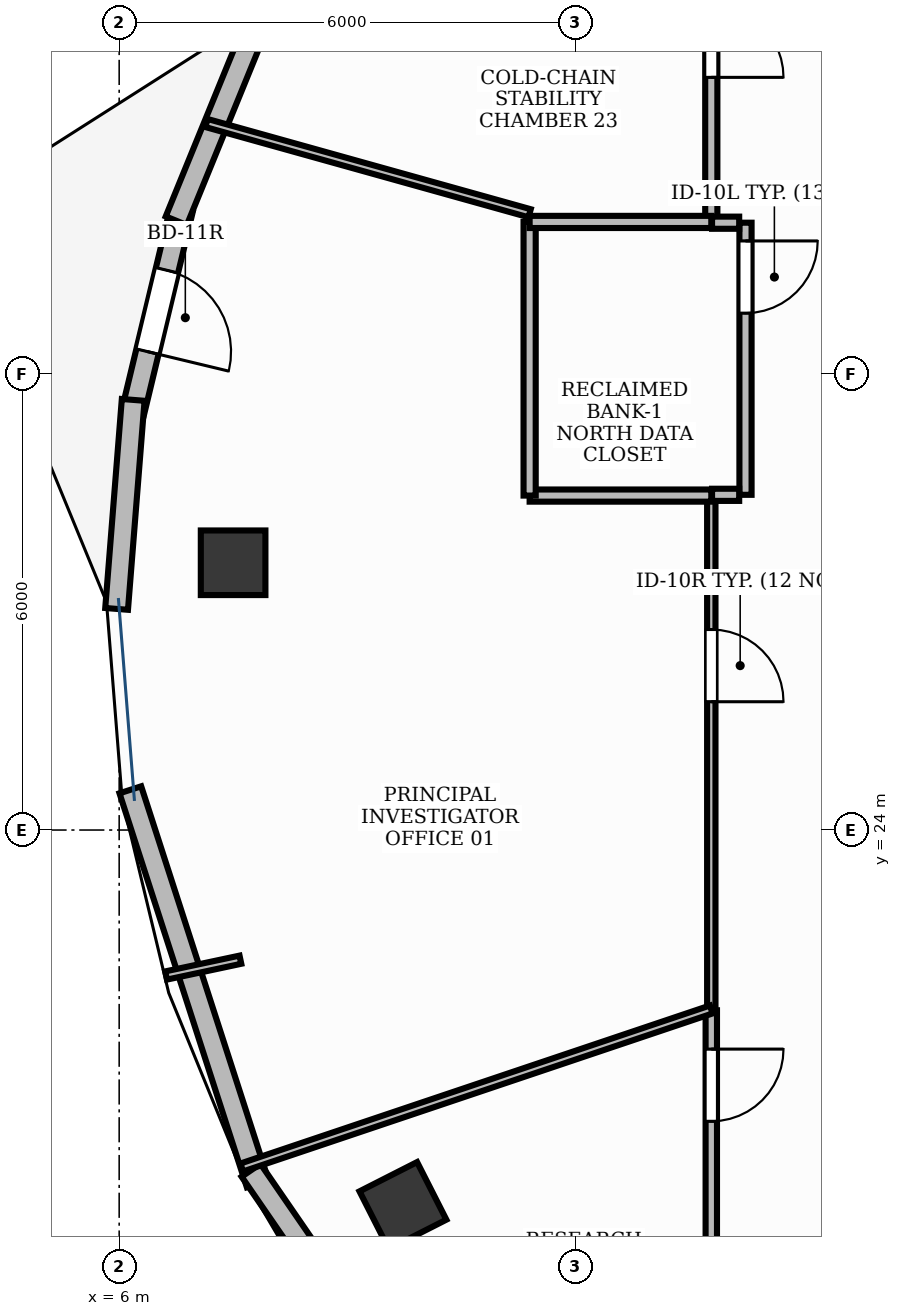
"""IFC4 building model, lengths in metres.
Left out: names, types, materials, properties, quantities, classifications, styles, units other than length and angle.
Written with IfcOpenShell. Run it as: python <this file> out.ifc"""

import sys

from ifc_helpers import new_model, si_unit, direction, frame, frame_2d, origin, origin_2d, place, context, subcontext, project, spatial, rectangle, extrude, element, fill, save


model = new_model("IFC4")
c1 = context("Model", 3, precision=1e-05, world=origin(), true_north=direction((0.0, 1.0)))
c2 = subcontext(c1, "Body", "Model", "MODEL_VIEW")
j1 = project(units=[si_unit("LENGTHUNIT", "METRE"), si_unit("PLANEANGLEUNIT", "RADIAN")], contexts=[c1])
p1 = place(None, origin())
s1 = spatial("IfcSite", under=j1, at=p1, CompositionType="ELEMENT")
p2 = place(p1, origin())
s2 = spatial("IfcBuilding", under=s1, at=p2, CompositionType="ELEMENT")
p3 = place(p2, frame((0.0, 0.0, 256.2)))
s3 = spatial("IfcBuildingStorey", under=s2, at=p3, CompositionType="ELEMENT", Elevation=256.2)
for number, where, z_axis, x_axis in (
    (1, (7.499, 27.516, -0.0), (0.0, 0.0, 1.0), (0.0, 1.0, 0.0)),
    (2, (9.733, 19.06, -0.0), (0.0, 0.0, 1.0), (-0.453, 0.891, 0.0)),
):
    element("IfcColumn", number, at=place(p3, frame(where, z_axis=z_axis, x_axis=x_axis)), inside=s3, PredefinedType="COLUMN", context=c2, shape_type="SweptSolid", body=[
        extrude(rectangle(XDim=0.85, YDim=0.85, at=origin_2d()), origin(), (0.0, 0.0, 1.0), 3.901),
    ])
p4 = place(p3, frame((6.822, 32.164, 0.0), z_axis=(0.0, 0.0, 1.0), x_axis=(-0.233611743884, -0.972329961031, 0.0)))
e3 = element("IfcWall", 3, at=p4, inside=s3, PredefinedType="STANDARD", context=c2, shape_type="SweptSolid", body=[
    extrude(rectangle(XDim=2.745, YDim=0.3, at=frame_2d((1.373, 0.0))), origin(), (0.0, 0.0, 1.0), 3.9),
])
p5 = place(p4, frame((0.823, 0.0, 0.0)))
e4 = element("IfcOpeningElement", 4, at=p5, cuts=e3, PredefinedType="OPENING", context=c2, shape_type="SweptSolid", body=[
    extrude(rectangle(XDim=1.1, YDim=2.15, at=frame_2d((0.55, 1.075))), frame((0.0, 0.165, 0.0), z_axis=(0.0, -1.0, 0.0), x_axis=(1.0, 0.0, 0.0)), (0.0, 0.0, 1.0), 0.33),
])
p6 = place(p3, frame((7.824, 34.642, 0.0), z_axis=(0.0, 0.0, 1.0), x_axis=(-0.378264258805, -0.925697656101, 0.0)))
e5 = element("IfcWall", 5, at=p6, inside=s3, PredefinedType="STANDARD", context=c2, shape_type="SweptSolid", body=[
    extrude(rectangle(XDim=2.837, YDim=0.3, at=frame_2d((1.419, 0.0))), origin(), (0.0, 0.0, 1.0), 3.9),
])
p7 = place(p3, frame((6.184, 29.659, 0.0), z_axis=(0.0, 0.0, 1.0), x_axis=(-0.079045093233, -0.996871041427, 0.0)))
e6 = element("IfcWall", 6, at=p7, inside=s3, PredefinedType="STANDARD", context=c2, shape_type="SweptSolid", body=[
    extrude(rectangle(XDim=2.758, YDim=0.3, at=frame_2d((1.379, 0.0))), origin(), (0.0, 0.0, 1.0), 3.9),
])
p8 = place(p3, frame((6.147, 24.529, 0.0), z_axis=(0.0, 0.0, 1.0), x_axis=(0.307501658213, -0.951547544895, 0.0)))
e7 = element("IfcWall", 7, at=p8, inside=s3, PredefinedType="STANDARD", context=c2, shape_type="SweptSolid", body=[
    extrude(rectangle(XDim=5.447, YDim=0.3, at=frame_2d((2.724, 0.0))), origin(), (0.0, 0.0, 1.0), 3.9),
])
p9 = place(p3, frame((7.735, 19.524, 0.0), z_axis=(0.0, 0.0, 1.0), x_axis=(0.566669772846, -0.823945003349, 0.0)))
e8 = element("IfcWall", 8, at=p9, inside=s3, PredefinedType="STANDARD", context=c2, shape_type="SweptSolid", body=[
    extrude(rectangle(XDim=5.734, YDim=0.3, at=frame_2d((2.867, 0.0))), origin(), (0.0, 0.0, 1.0), 3.9),
])
p10 = place(p3, frame((14.24, 31.99, 0.0), z_axis=(0.0, 0.0, 1.0), x_axis=(0.0, -1.0, 0.0)))
e9 = element("IfcWall", 9, at=p10, inside=s3, PredefinedType="PARTITIONING", context=c2, shape_type="SweptSolid", body=[
    extrude(rectangle(XDim=3.58, YDim=0.16, at=frame_2d((1.79, 0.0))), origin(), (0.0, 0.0, 1.0), 2.22),
])
p11 = place(p10, frame((0.24, 0.0, 0.0)))
e10 = element("IfcOpeningElement", 10, at=p11, cuts=e9, PredefinedType="OPENING", context=c2, shape_type="SweptSolid", body=[
    extrude(rectangle(XDim=0.95, YDim=2.15, at=frame_2d((0.475, 1.075))), frame((0.0, 0.095, 0.0), z_axis=(0.0, -1.0, 0.0), x_axis=(1.0, 0.0, 0.0)), (0.0, 0.0, 1.0), 0.19),
])
p12 = place(p3, frame((13.79, 28.39, 0.0), z_axis=(0.0, 0.0, 1.0), x_axis=(0.0, -1.0, 0.0)))
e11 = element("IfcWall", 11, at=p12, inside=s3, PredefinedType="MOVABLE", context=c2, shape_type="SweptSolid", body=[
    extrude(rectangle(XDim=6.75, YDim=0.11, at=frame_2d((3.375, 0.0))), origin(), (0.0, 0.0, 1.0), 2.22),
])
p13 = place(p12, frame((1.752, 0.0, 0.0)))
e12 = element("IfcOpeningElement", 12, at=p13, cuts=e11, PredefinedType="OPENING", context=c2, shape_type="SweptSolid", body=[
    extrude(rectangle(XDim=0.95, YDim=2.15, at=frame_2d((0.475, 1.075))), frame((0.0, 0.07, 0.0), z_axis=(0.0, -1.0, 0.0), x_axis=(1.0, 0.0, 0.0)), (0.0, 0.0, 1.0), 0.14),
])
p14 = place(p3, frame((13.79, 21.629, 0.0), z_axis=(0.0, 0.0, 1.0), x_axis=(0.0, -1.0, 0.0)))
e13 = element("IfcWall", 13, at=p14, inside=s3, PredefinedType="PARTITIONING", context=c2, shape_type="SweptSolid", body=[
    extrude(rectangle(XDim=4.392, YDim=0.15, at=frame_2d((2.196, 0.0))), origin(), (0.0, 0.0, 1.0), 2.22),
])
p15 = place(p14, frame((0.511, 0.0, 0.0)))
e14 = element("IfcOpeningElement", 14, at=p15, cuts=e13, PredefinedType="OPENING", context=c2, shape_type="SweptSolid", body=[
    extrude(rectangle(XDim=0.95, YDim=2.15, at=frame_2d((0.475, 1.075))), frame((0.0, 0.09, 0.0), z_axis=(0.0, -1.0, 0.0), x_axis=(1.0, 0.0, 0.0)), (0.0, 0.0, 1.0), 0.18),
])
p16 = place(p3, frame((13.79, 35.092, 0.0), z_axis=(0.0, 0.0, 1.0), x_axis=(0.0, -1.0, 0.0)))
e15 = element("IfcWall", 15, at=p16, inside=s3, PredefinedType="PARTITIONING", context=c2, shape_type="SweptSolid", body=[
    extrude(rectangle(XDim=3.082, YDim=0.16, at=frame_2d((1.541, 0.0))), origin(), (0.0, 0.0, 1.0), 2.22),
])
p17 = place(p16, frame((0.24, 0.0, 0.0)))
e16 = element("IfcOpeningElement", 16, at=p17, cuts=e15, PredefinedType="OPENING", context=c2, shape_type="SweptSolid", body=[
    extrude(rectangle(XDim=0.95, YDim=2.15, at=frame_2d((0.475, 1.075))), frame((0.0, 0.095, 0.0), z_axis=(0.0, -1.0, 0.0), x_axis=(1.0, 0.0, 0.0)), (0.0, 0.0, 1.0), 0.19),
])
for number, where, z_axis, x_axis in (
    (17, (13.8, 31.99, 0.0), (0.0, 0.0, 1.0), (1.0, 0.0, 0.0)),
    (18, (14.157, 28.41, 0.0), (0.0, 0.0, 1.0), (-1.0, 0.0, 0.0)),
):
    element("IfcWall", number, at=place(p3, frame(where, z_axis=z_axis, x_axis=x_axis)), inside=s3, PredefinedType="PARTITIONING", context=c2, shape_type="SweptSolid", body=[
        extrude(rectangle(XDim=0.357, YDim=0.16, at=frame_2d((0.178, 0.0))), origin(), (0.0, 0.0, 1.0), 2.22),
    ])
p18 = place(p3, frame((13.79, 28.4, 0.0), z_axis=(0.0, 0.0, 1.0), x_axis=(-1.0, 0.0, 0.0)))
e19 = element("IfcWall", 19, at=p18, inside=s3, PredefinedType="PARTITIONING", context=c2, shape_type="SweptSolid", body=[
    extrude(rectangle(XDim=2.39, YDim=0.16, at=frame_2d((1.195, 0.0))), origin(), (0.0, 0.0, 1.0), 2.22),
])
p19 = place(p3, frame((11.4, 28.4, 0.0), z_axis=(0.0, 0.0, 1.0), x_axis=(0.0, 1.0, 0.0)))
e20 = element("IfcWall", 20, at=p19, inside=s3, PredefinedType="PARTITIONING", context=c2, shape_type="SweptSolid", body=[
    extrude(rectangle(XDim=3.6, YDim=0.16, at=frame_2d((1.8, 0.0))), origin(), (0.0, 0.0, 1.0), 2.22),
])
p20 = place(p3, frame((11.4, 32.0, 0.0), z_axis=(0.0, 0.0, 1.0), x_axis=(1.0, 0.0, 0.0)))
e21 = element("IfcWall", 21, at=p20, inside=s3, PredefinedType="PARTITIONING", context=c2, shape_type="SweptSolid", body=[
    extrude(rectangle(XDim=2.39, YDim=0.16, at=frame_2d((1.195, 0.0))), origin(), (0.0, 0.0, 1.0), 2.22),
])
p21 = place(p3, frame((7.149, 33.301, 0.0), z_axis=(0.0, 0.0, 1.0), x_axis=(0.963173983888, -0.268878925842, 0.0)))
e22 = element("IfcWall", 22, at=p21, inside=s3, PredefinedType="MOVABLE", context=c2, shape_type="SweptSolid", body=[
    extrude(rectangle(XDim=4.414, YDim=0.11, at=frame_2d((2.207, 0.0))), origin(), (0.0, 0.0, 1.0), 2.22),
])
p22 = place(p3, frame((13.79, 21.639, 0.0), z_axis=(0.0, 0.0, 1.0), x_axis=(-0.947761619346, -0.318979486636, 0.0)))
e23 = element("IfcWall", 23, at=p22, inside=s3, PredefinedType="MOVABLE", context=c2, shape_type="SweptSolid", body=[
    extrude(rectangle(XDim=6.518, YDim=0.11, at=frame_2d((3.259, 0.0))), origin(), (0.0, 0.0, 1.0), 2.22),
])
p23 = place(p3, frame((6.617, 22.086, 0.0), z_axis=(0.0, 0.0, 1.0), x_axis=(0.978112274726, 0.208077817245, 0.0)))
e24 = element("IfcWall", 24, at=p23, inside=s3, PredefinedType="MOVABLE", context=c2, shape_type="SweptSolid", body=[
    extrude(rectangle(XDim=1.0, YDim=0.11, at=frame_2d((0.5, 0.0))), origin(), (0.0, 0.0, 1.0), 2.22),
])
p24 = place(p5, origin())
e25 = element("IfcDoor", 25, at=p24, inside=s3, OperationType="SINGLE_SWING_RIGHT", PredefinedType="DOOR", context=c2, shape_type="SweptSolid", body=[
    extrude(rectangle(XDim=1.1, YDim=2.15, at=frame_2d((0.55, 1.075))), frame((0.0, 0.025, 0.0), z_axis=(0.0, -1.0, 0.0), x_axis=(1.0, 0.0, 0.0)), (0.0, 0.0, 1.0), 0.05),
])
fill(e4, e25)
p25 = place(p11, origin())
e26 = element("IfcDoor", 26, at=p25, inside=s3, OperationType="SINGLE_SWING_LEFT", PredefinedType="DOOR", context=c2, shape_type="SweptSolid", body=[
    extrude(rectangle(XDim=0.95, YDim=2.15, at=frame_2d((0.475, 1.075))), frame((0.0, 0.025, 0.0), z_axis=(0.0, -1.0, 0.0), x_axis=(1.0, 0.0, 0.0)), (0.0, 0.0, 1.0), 0.05),
])
fill(e10, e26)
p26 = place(p13, origin())
e27 = element("IfcDoor", 27, at=p26, inside=s3, OperationType="SINGLE_SWING_RIGHT", PredefinedType="DOOR", context=c2, shape_type="SweptSolid", body=[
    extrude(rectangle(XDim=0.95, YDim=2.15, at=frame_2d((0.475, 1.075))), frame((0.0, 0.025, 0.0), z_axis=(0.0, -1.0, 0.0), x_axis=(1.0, 0.0, 0.0)), (0.0, 0.0, 1.0), 0.05),
])
fill(e12, e27)
p27 = place(p15, origin())
e28 = element("IfcDoor", 28, at=p27, inside=s3, OperationType="SINGLE_SWING_LEFT", PredefinedType="DOOR", context=c2, shape_type="SweptSolid", body=[
    extrude(rectangle(XDim=0.95, YDim=2.15, at=frame_2d((0.475, 1.075))), frame((0.0, 0.025, 0.0), z_axis=(0.0, -1.0, 0.0), x_axis=(1.0, 0.0, 0.0)), (0.0, 0.0, 1.0), 0.05),
])
fill(e14, e28)
p28 = place(p17, origin())
e29 = element("IfcDoor", 29, at=p28, inside=s3, OperationType="SINGLE_SWING_RIGHT", PredefinedType="DOOR", context=c2, shape_type="SweptSolid", body=[
    extrude(rectangle(XDim=0.95, YDim=2.15, at=frame_2d((0.475, 1.075))), frame((0.0, 0.025, 0.0), z_axis=(0.0, -1.0, 0.0), x_axis=(1.0, 0.0, 0.0)), (0.0, 0.0, 1.0), 0.05),
])
fill(e16, e29)
save(model, sys.argv[1])
